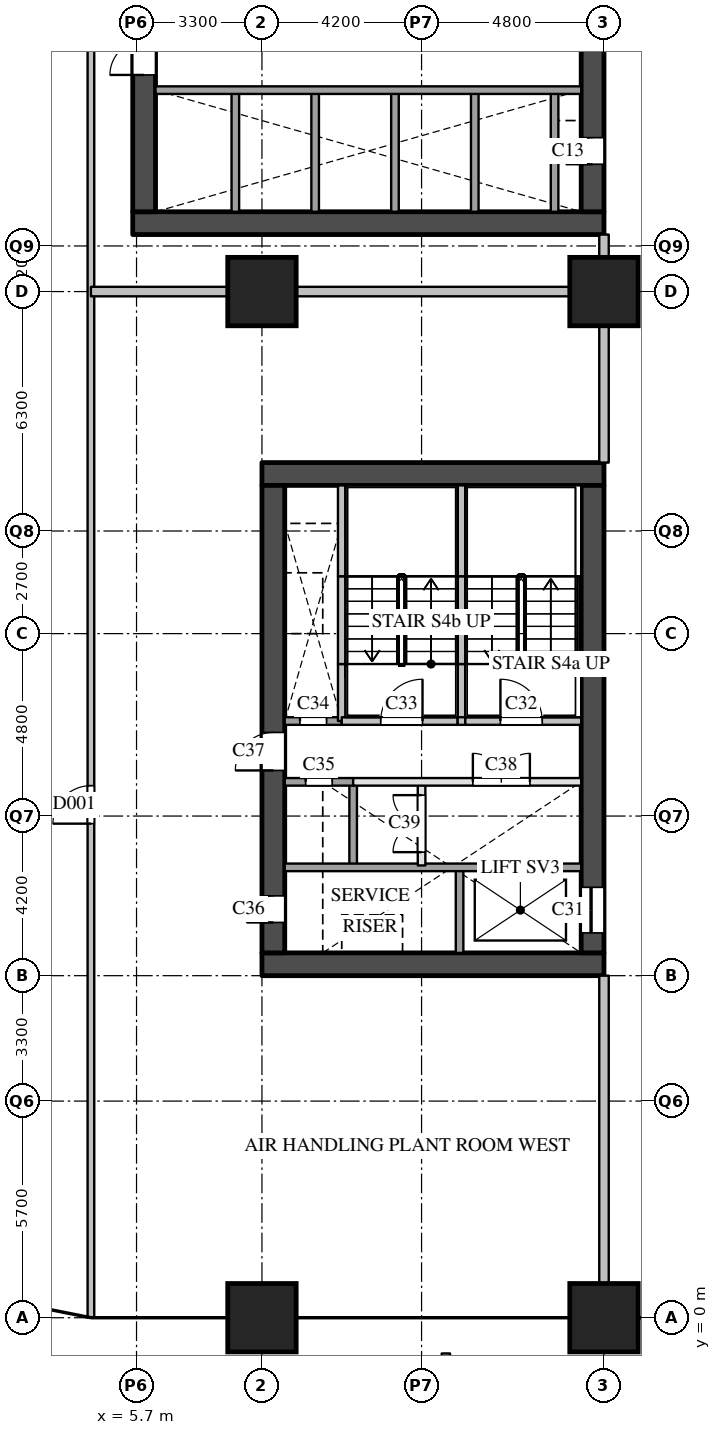
"""IFC4 building model, lengths in metres.
Left out: names, types, materials, properties, quantities, classifications, styles, units other than length and angle.
Written with IfcOpenShell. Run it as: python <this file> out.ifc"""

import sys

from ifc_helpers import new_model, si_unit, direction, frame, frame_2d, origin, origin_2d, place, context, subcontext, project, spatial, rectangle, extrude, element, fill, save


model = new_model("IFC4")
c1 = context("Model", 3, precision=1e-05, world=origin(), true_north=direction((0.0, 1.0)))
c2 = subcontext(c1, "Body", "Model", "MODEL_VIEW")
j1 = project(units=[si_unit("LENGTHUNIT", "METRE"), si_unit("PLANEANGLEUNIT", "RADIAN")], contexts=[c1])
p1 = place(None, origin())
s1 = spatial("IfcSite", under=j1, at=p1, CompositionType="ELEMENT")
p2 = place(p1, origin())
s2 = spatial("IfcBuilding", under=s1, at=p2, CompositionType="ELEMENT")
p3 = place(p2, frame((0.0, 0.0, 26.0)))
s3 = spatial("IfcBuildingStorey", under=s2, at=p3, CompositionType="ELEMENT", Elevation=26.0)
for number, where, z_axis, x_axis in (
    (1, (9.0, 0.0, 0.0), (0.0, 0.0, 1.0), (1.0, 0.0, 0.0)),
    (2, (9.0, 27.0, 0.0), (0.0, 0.0, 1.0), (1.0, 0.0, 0.0)),
    (3, (18.0, 0.0, 0.0), (0.0, 0.0, 1.0), (1.0, 0.0, 0.0)),
    (4, (18.0, 27.0, 0.0), (0.0, 0.0, 1.0), (1.0, 0.0, 0.0)),
):
    element("IfcColumn", number, at=place(p3, frame(where, z_axis=z_axis, x_axis=x_axis)), inside=s3, PredefinedType="COLUMN", context=c2, shape_type="SweptSolid", body=[
        extrude(rectangle(XDim=1.8, YDim=1.8, at=origin_2d()), origin(), (0.0, 0.0, 1.0), 5.0),
    ])
p4 = place(p3, frame((13.84, -20.95, 0.0), z_axis=(0.0, 0.0, 1.0), x_axis=(0.0, 1.0, 0.0)))
e5 = element("IfcWall", 5, at=p4, inside=s3, PredefinedType="PARAPET", context=c2, shape_type="SweptSolid", body=[
    extrude(rectangle(XDim=20.01, YDim=0.22, at=frame_2d((10.005, 0.0))), origin(), (0.0, 0.0, 1.0), 0.6),
])
p5 = place(p3, frame((5.6, 28.8, 0.0), z_axis=(0.0, 0.0, 1.0), x_axis=(1.0, 0.0, 0.0)))
e6 = element("IfcWall", 6, at=p5, inside=s3, PredefinedType="SHEAR", context=c2, shape_type="SweptSolid", body=[
    extrude(rectangle(XDim=12.4, YDim=0.6, at=frame_2d((6.2, 0.0))), origin(), (0.0, 0.0, 1.0), 4.7),
])
p6 = place(p3, frame((5.9, 29.1, 0.0), z_axis=(0.0, 0.0, 1.0), x_axis=(0.0, 1.0, 0.0)))
e7 = element("IfcWall", 7, at=p6, inside=s3, PredefinedType="SHEAR", context=c2, shape_type="SweptSolid", body=[
    extrude(rectangle(XDim=20.3, YDim=0.6, at=frame_2d((10.15, 0.0))), origin(), (0.0, 0.0, 1.0), 4.7),
])
p7 = place(p6, frame((3.6, 0.0, 0.0)))
e8 = element("IfcOpeningElement", 8, at=p7, cuts=e7, PredefinedType="OPENING", context=c2, shape_type="SweptSolid", body=[
    extrude(rectangle(XDim=1.8, YDim=2.1, at=frame_2d((0.9, 1.05))), frame((0.0, 0.31, 0.0), z_axis=(0.0, -1.0, 0.0), x_axis=(1.0, 0.0, 0.0)), (0.0, 0.0, 1.0), 0.62),
])
p8 = place(p6, frame((16.4, 0.0, 0.0)))
e9 = element("IfcOpeningElement", 9, at=p8, cuts=e7, PredefinedType="OPENING", context=c2, shape_type="SweptSolid", body=[
    extrude(rectangle(XDim=1.0, YDim=2.1, at=frame_2d((0.5, 1.05))), frame((0.0, 0.31, 0.0), z_axis=(0.0, -1.0, 0.0), x_axis=(1.0, 0.0, 0.0)), (0.0, 0.0, 1.0), 0.62),
])
p9 = place(p3, frame((17.7, 29.1, 0.0), z_axis=(0.0, 0.0, 1.0), x_axis=(0.0, 1.0, 0.0)))
e10 = element("IfcWall", 10, at=p9, inside=s3, PredefinedType="SHEAR", context=c2, shape_type="SweptSolid", body=[
    extrude(rectangle(XDim=20.3, YDim=0.6, at=frame_2d((10.15, 0.0))), origin(), (0.0, 0.0, 1.0), 4.7),
])
p10 = place(p9, frame((1.25, 0.0, 0.0)))
e11 = element("IfcOpeningElement", 11, at=p10, cuts=e10, PredefinedType="OPENING", context=c2, shape_type="SweptSolid", body=[
    extrude(rectangle(XDim=0.7, YDim=2.1, at=frame_2d((0.35, 1.05))), frame((0.0, 0.31, 0.0), z_axis=(0.0, -1.0, 0.0), x_axis=(1.0, 0.0, 0.0)), (0.0, 0.0, 1.0), 0.62),
])
p11 = place(p9, frame((8.3, 0.0, 0.0)))
e12 = element("IfcOpeningElement", 12, at=p11, cuts=e10, PredefinedType="OPENING", context=c2, shape_type="SweptSolid", body=[
    extrude(rectangle(XDim=0.7, YDim=2.1, at=frame_2d((0.35, 1.05))), frame((0.0, 0.31, 0.0), z_axis=(0.0, -1.0, 0.0), x_axis=(1.0, 0.0, 0.0)), (0.0, 0.0, 1.0), 0.62),
])
for number, where, z_axis, x_axis in (
    (13, (8.3, 29.1, 0.0), (0.0, 0.0, 1.0), (0.0, 1.0, 0.0)),
    (14, (10.4, 29.1, 0.0), (0.0, 0.0, 1.0), (0.0, 1.0, 0.0)),
    (15, (12.5, 29.1, 0.0), (0.0, 0.0, 1.0), (0.0, 1.0, 0.0)),
    (16, (14.6, 29.1, 0.0), (0.0, 0.0, 1.0), (0.0, 1.0, 0.0)),
    (17, (16.7, 29.1, 0.0), (0.0, 0.0, 1.0), (0.0, 1.0, 0.0)),
):
    element("IfcWall", number, at=place(p3, frame(where, z_axis=z_axis, x_axis=x_axis)), inside=s3, PredefinedType="SOLIDWALL", context=c2, shape_type="SweptSolid", body=[
        extrude(rectangle(XDim=3.2, YDim=0.2, at=frame_2d((1.6, 0.0))), origin(), (0.0, 0.0, 1.0), 4.7),
    ])
p12 = place(p3, frame((6.2, 32.3, 0.0), z_axis=(0.0, 0.0, 1.0), x_axis=(1.0, 0.0, 0.0)))
e18 = element("IfcWall", 18, at=p12, inside=s3, PredefinedType="SOLIDWALL", context=c2, shape_type="SweptSolid", body=[
    extrude(rectangle(XDim=11.2, YDim=0.2, at=frame_2d((5.6, 0.0))), origin(), (0.0, 0.0, 1.0), 4.7),
])
for number, where, z_axis, x_axis in (
    (19, (9.0, 9.3, 0.0), (0.0, 0.0, 1.0), (1.0, 0.0, 0.0)),
    (20, (9.0, 22.2, 0.0), (0.0, 0.0, 1.0), (1.0, 0.0, 0.0)),
):
    element("IfcWall", number, at=place(p3, frame(where, z_axis=z_axis, x_axis=x_axis)), inside=s3, PredefinedType="SHEAR", context=c2, shape_type="SweptSolid", body=[
        extrude(rectangle(XDim=9.0, YDim=0.6, at=frame_2d((4.5, 0.0))), origin(), (0.0, 0.0, 1.0), 4.7),
    ])
p13 = place(p3, frame((9.3, 9.6, 0.0), z_axis=(0.0, 0.0, 1.0), x_axis=(0.0, 1.0, 0.0)))
e21 = element("IfcWall", 21, at=p13, inside=s3, PredefinedType="SHEAR", context=c2, shape_type="SweptSolid", body=[
    extrude(rectangle(XDim=12.3, YDim=0.6, at=frame_2d((6.15, 0.0))), origin(), (0.0, 0.0, 1.0), 4.7),
])
p14 = place(p13, frame((0.8, 0.0, 0.0)))
e22 = element("IfcOpeningElement", 22, at=p14, cuts=e21, PredefinedType="OPENING", context=c2, shape_type="SweptSolid", body=[
    extrude(rectangle(XDim=0.7, YDim=2.1, at=frame_2d((0.35, 1.05))), frame((0.0, 0.31, 0.0), z_axis=(0.0, -1.0, 0.0), x_axis=(1.0, 0.0, 0.0)), (0.0, 0.0, 1.0), 0.62),
])
p15 = place(p13, frame((4.8, 0.0, 0.0)))
e23 = element("IfcOpeningElement", 23, at=p15, cuts=e21, PredefinedType="OPENING", context=c2, shape_type="SweptSolid", body=[
    extrude(rectangle(XDim=1.0, YDim=2.1, at=frame_2d((0.5, 1.05))), frame((0.0, 0.31, 0.0), z_axis=(0.0, -1.0, 0.0), x_axis=(1.0, 0.0, 0.0)), (0.0, 0.0, 1.0), 0.62),
])
p16 = place(p3, frame((17.7, 9.6, 0.0), z_axis=(0.0, 0.0, 1.0), x_axis=(0.0, 1.0, 0.0)))
e24 = element("IfcWall", 24, at=p16, inside=s3, PredefinedType="SHEAR", context=c2, shape_type="SweptSolid", body=[
    extrude(rectangle(XDim=12.3, YDim=0.6, at=frame_2d((6.15, 0.0))), origin(), (0.0, 0.0, 1.0), 4.7),
])
p17 = place(p16, frame((0.525, 0.0, 0.0)))
e25 = element("IfcOpeningElement", 25, at=p17, cuts=e24, PredefinedType="OPENING", context=c2, shape_type="SweptSolid", body=[
    extrude(rectangle(XDim=1.2, YDim=2.1, at=frame_2d((0.6, 1.05))), frame((0.0, 0.31, 0.0), z_axis=(0.0, -1.0, 0.0), x_axis=(1.0, 0.0, 0.0)), (0.0, 0.0, 1.0), 0.62),
])
p18 = place(p3, frame((11.1, 15.7, 0.0), z_axis=(0.0, 0.0, 1.0), x_axis=(0.0, 1.0, 0.0)))
e26 = element("IfcWall", 26, at=p18, inside=s3, PredefinedType="SOLIDWALL", context=c2, shape_type="SweptSolid", body=[
    extrude(rectangle(XDim=1.5, YDim=0.2, at=frame_2d((0.75, 0.0))), origin(), (0.0, 0.0, 1.0), 4.7),
])
p19 = place(p3, frame((11.1, 17.2, 0.0), z_axis=(0.0, 0.0, 1.0), x_axis=(0.0, 1.0, 0.0)))
e27 = element("IfcWall", 27, at=p19, inside=s3, PredefinedType="SOLIDWALL", context=c2, shape_type="SweptSolid", body=[
    extrude(rectangle(XDim=2.31, YDim=0.2, at=frame_2d((1.155, 0.0))), origin(), (0.0, 0.0, 1.0), 4.7),
])
p20 = place(p3, frame((11.1, 19.51, 0.0), z_axis=(0.0, 0.0, 1.0), x_axis=(0.0, 1.0, 0.0)))
e28 = element("IfcWall", 28, at=p20, inside=s3, PredefinedType="SOLIDWALL", context=c2, shape_type="SweptSolid", body=[
    extrude(rectangle(XDim=2.39, YDim=0.2, at=frame_2d((1.195, 0.0))), origin(), (0.0, 0.0, 1.0), 4.7),
])
p21 = place(p3, frame((11.4, 11.9, 0.0), z_axis=(0.0, 0.0, 1.0), x_axis=(0.0, 1.0, 0.0)))
e29 = element("IfcWall", 29, at=p21, inside=s3, PredefinedType="SOLIDWALL", context=c2, shape_type="SweptSolid", body=[
    extrude(rectangle(XDim=2.2, YDim=0.2, at=frame_2d((1.1, 0.0))), origin(), (0.0, 0.0, 1.0), 4.7),
])
p22 = place(p3, frame((13.2, 11.9, 0.0), z_axis=(0.0, 0.0, 1.0), x_axis=(0.0, 1.0, 0.0)))
e30 = element("IfcWall", 30, at=p22, inside=s3, PredefinedType="PARTITIONING", context=c2, shape_type="SweptSolid", body=[
    extrude(rectangle(XDim=2.2, YDim=0.2, at=frame_2d((1.1, 0.0))), origin(), (0.0, 0.0, 1.0), 4.7),
])
p23 = place(p22, frame((0.35, 0.0, 0.0)))
e31 = element("IfcOpeningElement", 31, at=p23, cuts=e30, PredefinedType="OPENING", context=c2, shape_type="SweptSolid", body=[
    extrude(rectangle(XDim=1.5, YDim=2.1, at=frame_2d((0.75, 1.05))), frame((0.0, 0.11, 0.0), z_axis=(0.0, -1.0, 0.0), x_axis=(1.0, 0.0, 0.0)), (0.0, 0.0, 1.0), 0.22),
])
p24 = place(p3, frame((14.2, 9.6, 0.0), z_axis=(0.0, 0.0, 1.0), x_axis=(0.0, 1.0, 0.0)))
e32 = element("IfcWall", 32, at=p24, inside=s3, PredefinedType="SOLIDWALL", context=c2, shape_type="SweptSolid", body=[
    extrude(rectangle(XDim=2.3, YDim=0.2, at=frame_2d((1.15, 0.0))), origin(), (0.0, 0.0, 1.0), 4.7),
])
p25 = place(p3, frame((14.25, 15.7, 0.0), z_axis=(0.0, 0.0, 1.0), x_axis=(0.0, 1.0, 0.0)))
e33 = element("IfcWall", 33, at=p25, inside=s3, PredefinedType="SOLIDWALL", context=c2, shape_type="SweptSolid", body=[
    extrude(rectangle(XDim=1.5, YDim=0.2, at=frame_2d((0.75, 0.0))), origin(), (0.0, 0.0, 1.0), 4.7),
])
p26 = place(p3, frame((14.25, 17.2, 0.0), z_axis=(0.0, 0.0, 1.0), x_axis=(0.0, 1.0, 0.0)))
e34 = element("IfcWall", 34, at=p26, inside=s3, PredefinedType="SOLIDWALL", context=c2, shape_type="SweptSolid", body=[
    extrude(rectangle(XDim=2.31, YDim=0.2, at=frame_2d((1.155, 0.0))), origin(), (0.0, 0.0, 1.0), 4.7),
])
p27 = place(p3, frame((14.25, 19.51, 0.0), z_axis=(0.0, 0.0, 1.0), x_axis=(0.0, 1.0, 0.0)))
e35 = element("IfcWall", 35, at=p27, inside=s3, PredefinedType="SOLIDWALL", context=c2, shape_type="SweptSolid", body=[
    extrude(rectangle(XDim=2.39, YDim=0.2, at=frame_2d((1.195, 0.0))), origin(), (0.0, 0.0, 1.0), 4.7),
])
p28 = place(p3, frame((9.6, 11.85, 0.0), z_axis=(0.0, 0.0, 1.0), x_axis=(1.0, 0.0, 0.0)))
e36 = element("IfcWall", 36, at=p28, inside=s3, PredefinedType="SOLIDWALL", context=c2, shape_type="SweptSolid", body=[
    extrude(rectangle(XDim=7.8, YDim=0.2, at=frame_2d((3.9, 0.0))), origin(), (0.0, 0.0, 1.0), 4.7),
])
p29 = place(p3, frame((11.4, 14.1, 0.0), z_axis=(0.0, 0.0, 1.0), x_axis=(1.0, 0.0, 0.0)))
e37 = element("IfcWall", 37, at=p29, inside=s3, PredefinedType="PARTITIONING", context=c2, shape_type="SweptSolid", body=[
    extrude(rectangle(XDim=6.0, YDim=0.2, at=frame_2d((3.0, 0.0))), origin(), (0.0, 0.0, 1.0), 4.7),
])
p30 = place(p29, frame((3.15, 0.0, 0.0)))
e38 = element("IfcOpeningElement", 38, at=p30, cuts=e37, PredefinedType="OPENING", context=c2, shape_type="SweptSolid", body=[
    extrude(rectangle(XDim=1.5, YDim=2.1, at=frame_2d((0.75, 1.05))), frame((0.0, 0.11, 0.0), z_axis=(0.0, -1.0, 0.0), x_axis=(1.0, 0.0, 0.0)), (0.0, 0.0, 1.0), 0.22),
])
p31 = place(p3, frame((9.6, 14.1, 0.0), z_axis=(0.0, 0.0, 1.0), x_axis=(1.0, 0.0, 0.0)))
e39 = element("IfcWall", 39, at=p31, inside=s3, PredefinedType="SOLIDWALL", context=c2, shape_type="SweptSolid", body=[
    extrude(rectangle(XDim=1.8, YDim=0.2, at=frame_2d((0.9, 0.0))), origin(), (0.0, 0.0, 1.0), 4.7),
])
p32 = place(p31, frame((0.55, 0.0, 0.0)))
e40 = element("IfcOpeningElement", 40, at=p32, cuts=e39, PredefinedType="OPENING", context=c2, shape_type="SweptSolid", body=[
    extrude(rectangle(XDim=0.7, YDim=2.1, at=frame_2d((0.35, 1.05))), frame((0.0, 0.11, 0.0), z_axis=(0.0, -1.0, 0.0), x_axis=(1.0, 0.0, 0.0)), (0.0, 0.0, 1.0), 0.22),
])
p33 = place(p3, frame((9.6, 15.7, 0.0), z_axis=(0.0, 0.0, 1.0), x_axis=(1.0, 0.0, 0.0)))
e41 = element("IfcWall", 41, at=p33, inside=s3, PredefinedType="SOLIDWALL", context=c2, shape_type="SweptSolid", body=[
    extrude(rectangle(XDim=1.5, YDim=0.2, at=frame_2d((0.75, 0.0))), origin(), (0.0, 0.0, 1.0), 4.7),
])
p34 = place(p33, frame((0.4, 0.0, 0.0)))
e42 = element("IfcOpeningElement", 42, at=p34, cuts=e41, PredefinedType="OPENING", context=c2, shape_type="SweptSolid", body=[
    extrude(rectangle(XDim=0.7, YDim=2.1, at=frame_2d((0.35, 1.05))), frame((0.0, 0.11, 0.0), z_axis=(0.0, -1.0, 0.0), x_axis=(1.0, 0.0, 0.0)), (0.0, 0.0, 1.0), 0.22),
])
p35 = place(p3, frame((11.1, 15.7, 0.0), z_axis=(0.0, 0.0, 1.0), x_axis=(1.0, 0.0, 0.0)))
e43 = element("IfcWall", 43, at=p35, inside=s3, PredefinedType="SOLIDWALL", context=c2, shape_type="SweptSolid", body=[
    extrude(rectangle(XDim=3.05, YDim=0.2, at=frame_2d((1.525, 0.0))), origin(), (0.0, 0.0, 1.0), 4.7),
])
p36 = place(p35, frame((1.025, 0.0, 0.0)))
e44 = element("IfcOpeningElement", 44, at=p36, cuts=e43, PredefinedType="OPENING", context=c2, shape_type="SweptSolid", body=[
    extrude(rectangle(XDim=1.1, YDim=2.1, at=frame_2d((0.55, 1.05))), frame((0.0, 0.11, 0.0), z_axis=(0.0, -1.0, 0.0), x_axis=(1.0, 0.0, 0.0)), (0.0, 0.0, 1.0), 0.22),
])
p37 = place(p3, frame((14.15, 15.7, 0.0), z_axis=(0.0, 0.0, 1.0), x_axis=(1.0, 0.0, 0.0)))
e45 = element("IfcWall", 45, at=p37, inside=s3, PredefinedType="SOLIDWALL", context=c2, shape_type="SweptSolid", body=[
    extrude(rectangle(XDim=0.2, YDim=0.2, at=frame_2d((0.1, 0.0))), origin(), (0.0, 0.0, 1.0), 4.7),
])
p38 = place(p3, frame((14.35, 15.7, 0.0), z_axis=(0.0, 0.0, 1.0), x_axis=(1.0, 0.0, 0.0)))
e46 = element("IfcWall", 46, at=p38, inside=s3, PredefinedType="SOLIDWALL", context=c2, shape_type="SweptSolid", body=[
    extrude(rectangle(XDim=3.05, YDim=0.2, at=frame_2d((1.525, 0.0))), origin(), (0.0, 0.0, 1.0), 4.7),
])
p39 = place(p38, frame((0.925, 0.0, 0.0)))
e47 = element("IfcOpeningElement", 47, at=p39, cuts=e46, PredefinedType="OPENING", context=c2, shape_type="SweptSolid", body=[
    extrude(rectangle(XDim=1.1, YDim=2.1, at=frame_2d((0.55, 1.05))), frame((0.0, 0.11, 0.0), z_axis=(0.0, -1.0, 0.0), x_axis=(1.0, 0.0, 0.0)), (0.0, 0.0, 1.0), 0.22),
])
p40 = place(p3, frame((4.5, 0.0, 0.0), z_axis=(0.0, 0.0, 1.0), x_axis=(0.0, 1.0, 0.0)))
e48 = element("IfcWall", 48, at=p40, inside=s3, PredefinedType="PARTITIONING", context=c2, shape_type="SweptSolid", body=[
    extrude(rectangle(XDim=51.0, YDim=0.175, at=frame_2d((25.5, 0.0))), origin(), (0.0, 0.0, 1.0), 4.7),
])
p41 = place(p40, frame((13.0, 0.0, 0.0)))
e49 = element("IfcOpeningElement", 49, at=p41, cuts=e48, PredefinedType="OPENING", context=c2, shape_type="SweptSolid", body=[
    extrude(rectangle(XDim=1.0, YDim=2.1, at=frame_2d((0.5, 1.05))), frame((0.0, 0.097, 0.0), z_axis=(0.0, -1.0, 0.0), x_axis=(1.0, 0.0, 0.0)), (0.0, 0.0, 1.0), 0.195),
])
p42 = place(p40, frame((38.5, 0.0, 0.0)))
e50 = element("IfcOpeningElement", 50, at=p42, cuts=e48, PredefinedType="OPENING", context=c2, shape_type="SweptSolid", body=[
    extrude(rectangle(XDim=1.0, YDim=2.1, at=frame_2d((0.5, 1.05))), frame((0.0, 0.097, 0.0), z_axis=(0.0, -1.0, 0.0), x_axis=(1.0, 0.0, 0.0)), (0.0, 0.0, 1.0), 0.195),
])
p43 = place(p3, frame((4.5, 27.0, 0.0), z_axis=(0.0, 0.0, 1.0), x_axis=(1.0, 0.0, 0.0)))
e51 = element("IfcWall", 51, at=p43, inside=s3, PredefinedType="PARTITIONING", context=c2, shape_type="SweptSolid", body=[
    extrude(rectangle(XDim=13.5, YDim=0.25, at=frame_2d((6.75, 0.0))), origin(), (0.0, 0.0, 1.0), 4.7),
])
p44 = place(p3, frame((18.0, 0.0, 0.0), z_axis=(0.0, 0.0, 1.0), x_axis=(0.0, 1.0, 0.0)))
e52 = element("IfcWall", 52, at=p44, inside=s3, PredefinedType="PARTITIONING", context=c2, shape_type="SweptSolid", body=[
    extrude(rectangle(XDim=9.0, YDim=0.25, at=frame_2d((4.5, 0.0))), origin(), (0.0, 0.0, 1.0), 4.7),
])
p45 = place(p3, frame((18.0, 22.5, 0.0), z_axis=(0.0, 0.0, 1.0), x_axis=(0.0, 1.0, 0.0)))
e53 = element("IfcWall", 53, at=p45, inside=s3, PredefinedType="PARTITIONING", context=c2, shape_type="SweptSolid", body=[
    extrude(rectangle(XDim=6.0, YDim=0.25, at=frame_2d((3.0, 0.0))), origin(), (0.0, 0.0, 1.0), 4.7),
])
p46 = place(p10, origin())
e54 = element("IfcDoor", 54, at=p46, inside=s3, OperationType="SINGLE_SWING_LEFT", PredefinedType="DOOR", context=c2, shape_type="SweptSolid", body=[
    extrude(rectangle(XDim=0.7, YDim=2.1, at=frame_2d((0.35, 1.05))), frame((0.0, 0.025, 0.0), z_axis=(0.0, -1.0, 0.0), x_axis=(1.0, 0.0, 0.0)), (0.0, 0.0, 1.0), 0.05),
])
fill(e11, e54)
p47 = place(p7, origin())
e55 = element("IfcDoor", 55, at=p47, inside=s3, OperationType="DOUBLE_DOOR_SINGLE_SWING", PredefinedType="DOOR", context=c2, shape_type="SweptSolid", body=[
    extrude(rectangle(XDim=1.8, YDim=2.1, at=frame_2d((0.9, 1.05))), frame((0.0, 0.025, 0.0), z_axis=(0.0, -1.0, 0.0), x_axis=(1.0, 0.0, 0.0)), (0.0, 0.0, 1.0), 0.05),
])
fill(e8, e55)
p48 = place(p17, origin())
e56 = element("IfcDoor", 56, at=p48, inside=s3, OperationType="SLIDING_TO_LEFT", PredefinedType="DOOR", context=c2, shape_type="SweptSolid", body=[
    extrude(rectangle(XDim=1.2, YDim=2.1, at=frame_2d((0.6, 1.05))), frame((0.0, 0.025, 0.0), z_axis=(0.0, -1.0, 0.0), x_axis=(1.0, 0.0, 0.0)), (0.0, 0.0, 1.0), 0.05),
])
fill(e25, e56)
p49 = place(p39, origin())
e57 = element("IfcDoor", 57, at=p49, inside=s3, OperationType="SINGLE_SWING_LEFT", PredefinedType="DOOR", context=c2, shape_type="SweptSolid", body=[
    extrude(rectangle(XDim=1.1, YDim=2.1, at=frame_2d((0.55, 1.05))), frame((0.0, 0.025, 0.0), z_axis=(0.0, -1.0, 0.0), x_axis=(1.0, 0.0, 0.0)), (0.0, 0.0, 1.0), 0.05),
])
fill(e47, e57)
p50 = place(p36, origin())
e58 = element("IfcDoor", 58, at=p50, inside=s3, OperationType="SINGLE_SWING_RIGHT", PredefinedType="DOOR", context=c2, shape_type="SweptSolid", body=[
    extrude(rectangle(XDim=1.1, YDim=2.1, at=frame_2d((0.55, 1.05))), frame((0.0, 0.025, 0.0), z_axis=(0.0, -1.0, 0.0), x_axis=(1.0, 0.0, 0.0)), (0.0, 0.0, 1.0), 0.05),
])
fill(e44, e58)
p51 = place(p34, origin())
e59 = element("IfcDoor", 59, at=p51, inside=s3, OperationType="SINGLE_SWING_LEFT", PredefinedType="DOOR", context=c2, shape_type="SweptSolid", body=[
    extrude(rectangle(XDim=0.7, YDim=2.1, at=frame_2d((0.35, 1.05))), frame((0.0, 0.025, 0.0), z_axis=(0.0, -1.0, 0.0), x_axis=(1.0, 0.0, 0.0)), (0.0, 0.0, 1.0), 0.05),
])
fill(e42, e59)
p52 = place(p32, origin())
e60 = element("IfcDoor", 60, at=p52, inside=s3, OperationType="SINGLE_SWING_LEFT", PredefinedType="DOOR", context=c2, shape_type="SweptSolid", body=[
    extrude(rectangle(XDim=0.7, YDim=2.1, at=frame_2d((0.35, 1.05))), frame((0.0, 0.025, 0.0), z_axis=(0.0, -1.0, 0.0), x_axis=(1.0, 0.0, 0.0)), (0.0, 0.0, 1.0), 0.05),
])
fill(e40, e60)
p53 = place(p14, origin())
e61 = element("IfcDoor", 61, at=p53, inside=s3, OperationType="SINGLE_SWING_LEFT", PredefinedType="DOOR", context=c2, shape_type="SweptSolid", body=[
    extrude(rectangle(XDim=0.7, YDim=2.1, at=frame_2d((0.35, 1.05))), frame((0.0, 0.025, 0.0), z_axis=(0.0, -1.0, 0.0), x_axis=(1.0, 0.0, 0.0)), (0.0, 0.0, 1.0), 0.05),
])
fill(e22, e61)
p54 = place(p15, origin())
e62 = element("IfcDoor", 62, at=p54, inside=s3, OperationType="SINGLE_SWING_LEFT", PredefinedType="DOOR", context=c2, shape_type="SweptSolid", body=[
    extrude(rectangle(XDim=1.0, YDim=2.1, at=frame_2d((0.5, 1.05))), frame((0.0, 0.025, 0.0), z_axis=(0.0, -1.0, 0.0), x_axis=(1.0, 0.0, 0.0)), (0.0, 0.0, 1.0), 0.05),
])
fill(e23, e62)
p55 = place(p30, origin())
e63 = element("IfcDoor", 63, at=p55, inside=s3, OperationType="DOUBLE_DOOR_SINGLE_SWING", PredefinedType="DOOR", context=c2, shape_type="SweptSolid", body=[
    extrude(rectangle(XDim=1.5, YDim=2.1, at=frame_2d((0.75, 1.05))), frame((0.0, 0.025, 0.0), z_axis=(0.0, -1.0, 0.0), x_axis=(1.0, 0.0, 0.0)), (0.0, 0.0, 1.0), 0.05),
])
fill(e38, e63)
p56 = place(p23, origin())
e64 = element("IfcDoor", 64, at=p56, inside=s3, OperationType="DOUBLE_DOOR_SINGLE_SWING", PredefinedType="DOOR", context=c2, shape_type="SweptSolid", body=[
    extrude(rectangle(XDim=1.5, YDim=2.1, at=frame_2d((0.75, 1.05))), frame((0.0, 0.025, 0.0), z_axis=(0.0, -1.0, 0.0), x_axis=(1.0, 0.0, 0.0)), (0.0, 0.0, 1.0), 0.05),
])
fill(e31, e64)
p57 = place(p41, origin())
e65 = element("IfcDoor", 65, at=p57, inside=s3, OperationType="SINGLE_SWING_LEFT", PredefinedType="DOOR", context=c2, shape_type="SweptSolid", body=[
    extrude(rectangle(XDim=1.0, YDim=2.1, at=frame_2d((0.5, 1.05))), frame((0.0, 0.025, 0.0), z_axis=(0.0, -1.0, 0.0), x_axis=(1.0, 0.0, 0.0)), (0.0, 0.0, 1.0), 0.05),
])
fill(e49, e65)
save(model, sys.argv[1])
